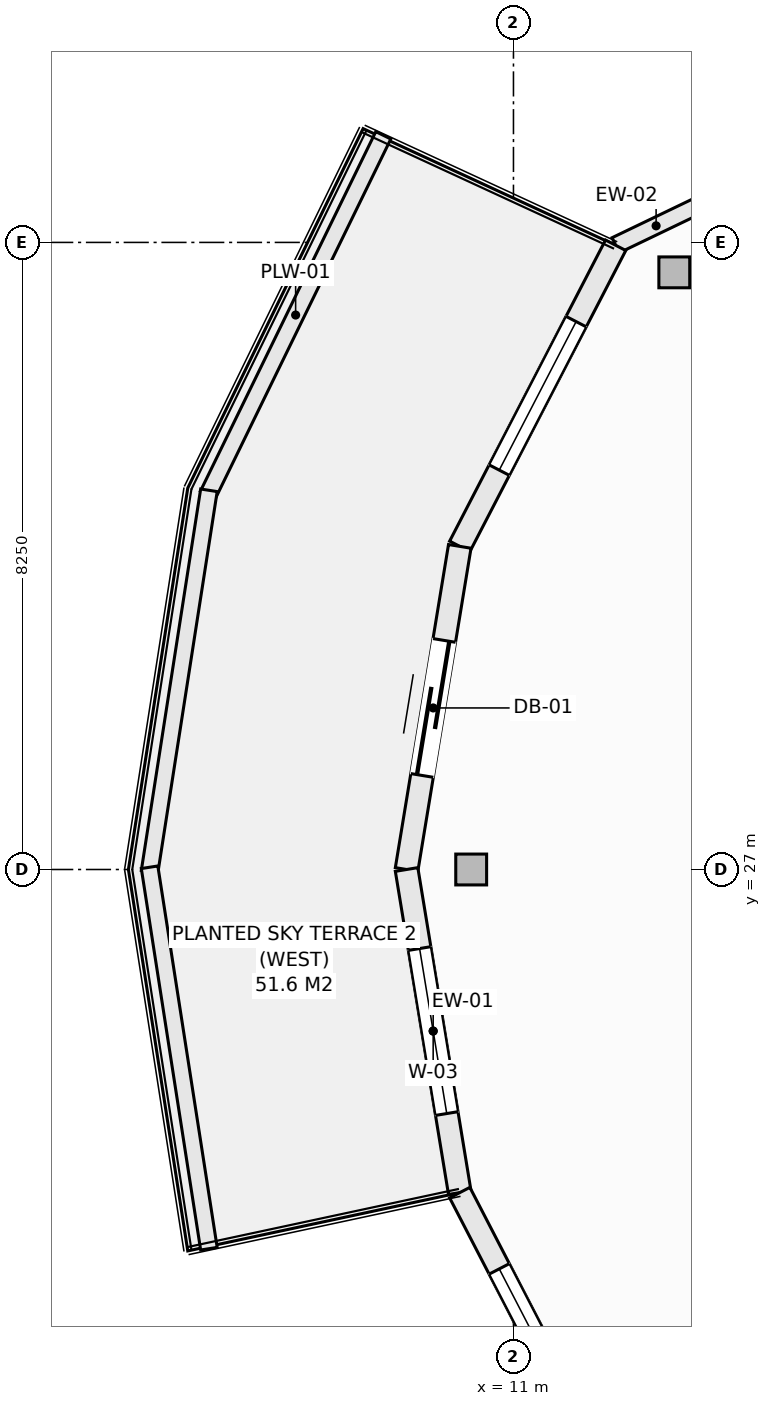
"""IFC4 building model, lengths in metres.
Left out: names, types, materials, properties, quantities, classifications, styles, units other than length and angle.
Written with IfcOpenShell. Run it as: python <this file> out.ifc"""

import sys

from ifc_helpers import new_model, si_unit, direction, frame, frame_2d, origin, origin_2d, place, context, subcontext, project, spatial, rectangle, hollow_rectangle, extrude, element, fill, save


model = new_model("IFC4")
c1 = context("Model", 3, precision=1e-05, world=origin(), true_north=direction((0.0, 1.0)))
c2 = subcontext(c1, "Body", "Model", "MODEL_VIEW")
j1 = project(units=[si_unit("LENGTHUNIT", "METRE"), si_unit("PLANEANGLEUNIT", "RADIAN")], contexts=[c1])
p1 = place(None, origin())
s1 = spatial("IfcSite", under=j1, at=p1, CompositionType="ELEMENT")
p2 = place(p1, origin())
s2 = spatial("IfcBuilding", under=s1, at=p2, CompositionType="ELEMENT")
p3 = place(p2, frame((0.0, 0.0, 259.1)))
s3 = spatial("IfcBuildingStorey", under=s2, at=p3, CompositionType="ELEMENT", Elevation=259.1)
for number, where, z_axis, x_axis in (
    (1, (13.116, 34.856, -0.27), (0.0, 0.0, 1.0), (1.0, 0.0, 0.0)),
    (2, (10.444, 27.0, -0.27), (0.0, 0.0, 1.0), (1.0, 0.0, 0.0)),
):
    element("IfcColumn", number, at=place(p3, frame(where, z_axis=z_axis, x_axis=x_axis)), inside=s3, PredefinedType="COLUMN", context=c2, shape_type="SweptSolid", body=[
        extrude(hollow_rectangle(XDim=0.406, YDim=0.406, WallThickness=0.016, at=origin_2d()), origin(), (0.0, 0.0, 1.0), 3.3),
    ])
p4 = place(p3, frame((12.344, 35.212, 0.0), z_axis=(0.0, 0.0, 1.0), x_axis=(0.901264843027, 0.433268603437, 0.0)))
e3 = element("IfcWall", 3, at=p4, inside=s3, PredefinedType="SOLIDWALL", context=c2, shape_type="SweptSolid", body=[
    extrude(rectangle(XDim=1.181, YDim=0.22, at=frame_2d((0.591, 0.0))), origin(), (0.0, 0.0, 1.0), 2.605),
])
p5 = place(p3, frame((10.293, 31.251, 0.0), z_axis=(0.0, 0.0, 1.0), x_axis=(0.459801070243, 0.888021945564, 0.0)))
e4 = element("IfcWall", 4, at=p5, inside=s3, PredefinedType="SOLIDWALL", context=c2, shape_type="SweptSolid", body=[
    extrude(rectangle(XDim=4.461, YDim=0.3, at=frame_2d((2.23, 0.0))), origin(), (0.0, 0.0, 1.0), 2.605),
])
p6 = place(p5, frame((1.13, 0.0, 0.72)))
e5 = element("IfcOpeningElement", 5, at=p6, cuts=e4, PredefinedType="OPENING", context=c2, shape_type="SweptSolid", body=[
    extrude(rectangle(XDim=2.2, YDim=1.65, at=frame_2d((1.1, 0.825))), frame((0.0, 0.16, 0.0), z_axis=(0.0, -1.0, 0.0), x_axis=(1.0, 0.0, 0.0)), (0.0, 0.0, 1.0), 0.32),
])
p7 = place(p3, frame((9.594, 27.0, 0.0), z_axis=(0.0, 0.0, 1.0), x_axis=(0.162404622434, 0.98672424649, 0.0)))
e6 = element("IfcWall", 6, at=p7, inside=s3, PredefinedType="SOLIDWALL", context=c2, shape_type="SweptSolid", body=[
    extrude(rectangle(XDim=4.308, YDim=0.3, at=frame_2d((2.154, 0.0))), origin(), (0.0, 0.0, 1.0), 2.605),
])
p8 = place(p7, frame((1.254, 0.0, 0.0)))
e7 = element("IfcOpeningElement", 7, at=p8, cuts=e6, PredefinedType="OPENING", context=c2, shape_type="SweptSolid", body=[
    extrude(rectangle(XDim=1.8, YDim=2.25, at=frame_2d((0.9, 1.125))), frame((0.0, 0.16, 0.0), z_axis=(0.0, -1.0, 0.0), x_axis=(1.0, 0.0, 0.0)), (0.0, 0.0, 1.0), 0.32),
])
p9 = place(p3, frame((9.594, 27.0, 0.0), z_axis=(0.0, 0.0, 1.0), x_axis=(0.162404622434, -0.98672424649, 0.0)))
e8 = element("IfcWall", 8, at=p9, inside=s3, PredefinedType="SOLIDWALL", context=c2, shape_type="SweptSolid", body=[
    extrude(rectangle(XDim=4.308, YDim=0.3, at=frame_2d((2.154, 0.0))), origin(), (0.0, 0.0, 1.0), 2.605),
])
p10 = place(p9, frame((1.054, 0.0, 0.72)))
e9 = element("IfcOpeningElement", 9, at=p10, cuts=e8, PredefinedType="OPENING", context=c2, shape_type="SweptSolid", body=[
    extrude(rectangle(XDim=2.2, YDim=1.65, at=frame_2d((1.1, 0.825))), frame((0.0, 0.16, 0.0), z_axis=(0.0, -1.0, 0.0), x_axis=(1.0, 0.0, 0.0)), (0.0, 0.0, 1.0), 0.32),
])
p11 = place(p3, frame((10.293, 22.749, 0.0), z_axis=(0.0, 0.0, 1.0), x_axis=(0.459801070243, -0.888021945564, 0.0)))
e10 = element("IfcWall", 10, at=p11, inside=s3, PredefinedType="SOLIDWALL", context=c2, shape_type="SweptSolid", body=[
    extrude(rectangle(XDim=4.461, YDim=0.3, at=frame_2d((2.23, 0.0))), origin(), (0.0, 0.0, 1.0), 2.605),
])
p12 = place(p11, frame((1.13, 0.0, 0.72)))
e11 = element("IfcOpeningElement", 11, at=p12, cuts=e10, PredefinedType="OPENING", context=c2, shape_type="SweptSolid", body=[
    extrude(rectangle(XDim=2.2, YDim=1.65, at=frame_2d((1.1, 0.825))), frame((0.0, 0.16, 0.0), z_axis=(0.0, -1.0, 0.0), x_axis=(1.0, 0.0, 0.0)), (0.0, 0.0, 1.0), 0.32),
])
p13 = place(p3, frame((6.98, 31.93, 0.0), z_axis=(0.0, 0.0, 1.0), x_axis=(0.438469339137, 0.898746148051, 0.0)))
e12 = element("IfcWall", 12, at=p13, inside=s3, PredefinedType="PARAPET", context=c2, shape_type="SweptSolid", body=[
    extrude(rectangle(XDim=5.262, YDim=0.22, at=frame_2d((2.631, 0.0))), origin(), (0.0, 0.0, 1.0), 0.52),
])
for number, where, z_axis, x_axis in (
    (13, (6.212, 26.971, 0.0), (0.0, 0.0, 1.0), (0.154, 0.988, 0.0)),
    (14, (6.212, 27.029, 0.0), (0.0, 0.0, 1.0), (0.154, -0.988, 0.0)),
):
    element("IfcWall", number, at=place(p3, frame(where, z_axis=z_axis, x_axis=x_axis)), inside=s3, PredefinedType="PARAPET", context=c2, shape_type="SweptSolid", body=[
        extrude(rectangle(XDim=5.078, YDim=0.22, at=frame_2d((2.539, 0.0))), origin(), (0.0, 0.0, 1.0), 0.52),
    ])
p14 = place(p6, origin())
e15 = element("IfcWindow", 15, at=p14, inside=s3, PartitioningType="SINGLE_PANEL", PredefinedType="WINDOW", context=c2, shape_type="SweptSolid", body=[
    extrude(rectangle(XDim=2.2, YDim=1.65, at=frame_2d((1.1, 0.825))), frame((0.0, 0.03, 0.0), z_axis=(0.0, -1.0, 0.0), x_axis=(1.0, 0.0, 0.0)), (0.0, 0.0, 1.0), 0.06),
])
fill(e5, e15)
p15 = place(p8, origin())
e16 = element("IfcDoor", 16, at=p15, inside=s3, OperationType="SLIDING_TO_LEFT", PredefinedType="DOOR", context=c2, shape_type="SweptSolid", body=[
    extrude(rectangle(XDim=1.8, YDim=2.25, at=frame_2d((0.9, 1.125))), frame((0.0, 0.025, 0.0), z_axis=(0.0, -1.0, 0.0), x_axis=(1.0, 0.0, 0.0)), (0.0, 0.0, 1.0), 0.05),
])
fill(e7, e16)
p16 = place(p10, origin())
e17 = element("IfcWindow", 17, at=p16, inside=s3, PartitioningType="SINGLE_PANEL", PredefinedType="WINDOW", context=c2, shape_type="SweptSolid", body=[
    extrude(rectangle(XDim=2.2, YDim=1.65, at=frame_2d((1.1, 0.825))), frame((0.0, 0.03, 0.0), z_axis=(0.0, -1.0, 0.0), x_axis=(1.0, 0.0, 0.0)), (0.0, 0.0, 1.0), 0.06),
])
fill(e9, e17)
p17 = place(p12, origin())
e18 = element("IfcWindow", 18, at=p17, inside=s3, PartitioningType="SINGLE_PANEL", PredefinedType="WINDOW", context=c2, shape_type="SweptSolid", body=[
    extrude(rectangle(XDim=2.2, YDim=1.65, at=frame_2d((1.1, 0.825))), frame((0.0, 0.03, 0.0), z_axis=(0.0, -1.0, 0.0), x_axis=(1.0, 0.0, 0.0)), (0.0, 0.0, 1.0), 0.06),
])
fill(e11, e18)
save(model, sys.argv[1])
